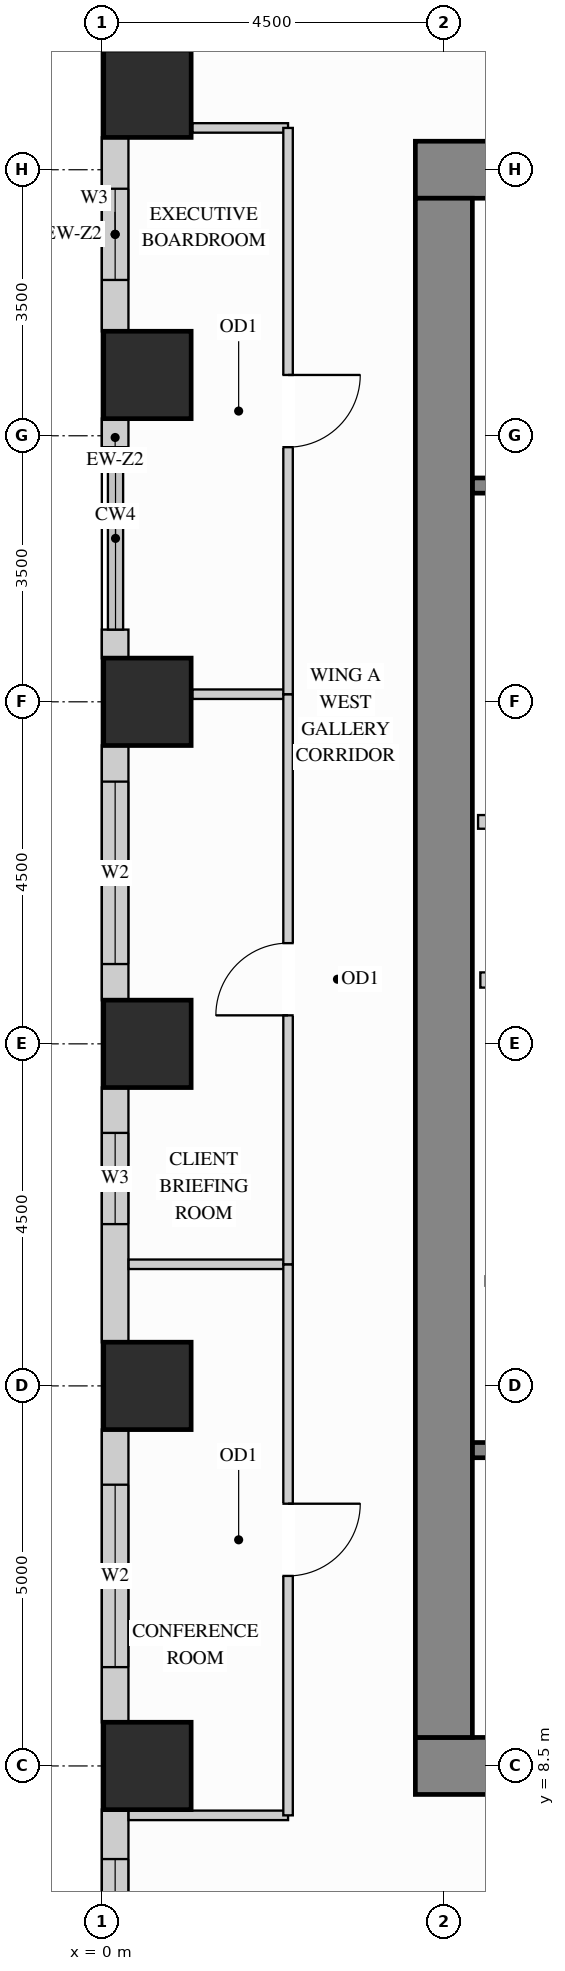
"""IFC4 building model, lengths in metres.
Left out: names, types, materials, properties, quantities, classifications, styles, units other than length and angle.
Written with IfcOpenShell. Run it as: python <this file> out.ifc"""

import sys

from ifc_helpers import new_model, si_unit, direction, frame, frame_2d, origin, origin_2d, place, context, subcontext, project, spatial, rectangle, extrude, source, transform, mapped, element, fill, save


model = new_model("IFC4")
c1 = context("Model", 3, precision=1e-05, world=origin(), true_north=direction((0.0, 1.0)))
c2 = subcontext(c1, "Body", "Model", "MODEL_VIEW")
j1 = project(units=[si_unit("LENGTHUNIT", "METRE"), si_unit("PLANEANGLEUNIT", "RADIAN")], contexts=[c1])
p1 = place(None, origin())
s1 = spatial("IfcSite", under=j1, at=p1, CompositionType="ELEMENT")
p2 = place(p1, origin())
s2 = spatial("IfcBuilding", under=s1, at=p2, CompositionType="ELEMENT")
p3 = place(p2, frame((0.0, 0.0, 81.0)))
s3 = spatial("IfcBuildingStorey", under=s2, at=p3, CompositionType="ELEMENT", Elevation=81.0)
m1 = source(origin(), c2, "Body", "SweptSolid", [
    extrude(rectangle(XDim=1.15, YDim=1.15, at=origin_2d()), origin(), (0.0, 0.0, 1.0), 3.38),
])
for number, where, z_axis, x_axis in (
    (1, (0.6, 13.5, 0.0), (0.0, 0.0, 1.0), (1.0, 0.0, 0.0)),
    (2, (0.6, 18.0, 0.0), (0.0, 0.0, 1.0), (1.0, 0.0, 0.0)),
    (3, (0.6, 22.5, 0.0), (0.0, 0.0, 1.0), (1.0, 0.0, 0.0)),
    (4, (0.6, 26.8, 0.0), (0.0, 0.0, 1.0), (1.0, 0.0, 0.0)),
    (5, (0.6, 30.5, 0.0), (0.0, 0.0, 1.0), (1.0, 0.0, 0.0)),
    (6, (0.6, 8.5, 0.0), (0.0, 0.0, 1.0), (1.0, 0.0, 0.0)),
):
    element("IfcColumn", number, at=place(p3, frame(where, z_axis=z_axis, x_axis=x_axis)), inside=s3, PredefinedType="COLUMN", context=c2, shape_type="MappedRepresentation", body=[
        mapped(m1, transform((0.0, 0.0, 0.0), x_axis=(1.0, 0.0, 0.0), y_axis=(0.0, 1.0, 0.0), z_axis=(0.0, 0.0, 1.0))),
    ])
m2 = source(origin(), c2, "Body", "SweptSolid", [
    extrude(rectangle(XDim=10.75, YDim=0.75, at=frame_2d((5.375, 0.0))), origin(), (0.0, 0.0, 1.0), 3.38),
])
for number, where, z_axis, x_axis in (
    (7, (4.125, 29.5, 0.0), (0.0, 0.0, 1.0), (1.0, 0.0, 0.0)),
    (8, (4.125, 8.5, 0.0), (0.0, 0.0, 1.0), (1.0, 0.0, 0.0)),
):
    element("IfcWall", number, at=place(p3, frame(where, z_axis=z_axis, x_axis=x_axis)), inside=s3, PredefinedType="SHEAR", context=c2, shape_type="MappedRepresentation", body=[
        mapped(m2, transform((0.0, 0.0, 0.0), x_axis=(1.0, 0.0, 0.0), y_axis=(0.0, 1.0, 0.0), z_axis=(0.0, 0.0, 1.0))),
    ])
m3 = source(origin(), c2, "Body", "SweptSolid", [
    extrude(rectangle(XDim=20.25, YDim=0.75, at=frame_2d((10.125, 0.0))), origin(), (0.0, 0.0, 1.0), 3.38),
])
p4 = place(p3, frame((4.5, 8.875, 0.0), z_axis=(0.0, 0.0, 1.0), x_axis=(0.0, 1.0, 0.0)))
e9 = element("IfcWall", 9, at=p4, inside=s3, PredefinedType="SHEAR", context=c2, shape_type="MappedRepresentation", body=[
    mapped(m3, transform((0.0, 0.0, 0.0), x_axis=(1.0, 0.0, 0.0), y_axis=(0.0, 1.0, 0.0), z_axis=(0.0, 0.0, 1.0))),
])
p5 = place(p3, frame((0.175, 29.927, 0.0), z_axis=(0.0, 0.0, 1.0), x_axis=(0.0, -1.0, 0.0)))
e10 = element("IfcWall", 10, at=p5, inside=s3, PredefinedType="SOLIDWALL", context=c2, shape_type="SweptSolid", body=[
    extrude(rectangle(XDim=2.554, YDim=0.35, at=frame_2d((1.277, 0.0))), origin(), (0.0, 0.0, 1.0), 3.365),
])
p6 = place(p5, frame((0.677, 0.0, 0.78)))
e11 = element("IfcOpeningElement", 11, at=p6, cuts=e10, PredefinedType="OPENING", context=c2, shape_type="SweptSolid", body=[
    extrude(rectangle(XDim=1.2, YDim=2.1, at=frame_2d((0.6, 1.05))), frame((0.0, 0.185, 0.0), z_axis=(0.0, -1.0, 0.0), x_axis=(1.0, 0.0, 0.0)), (0.0, 0.0, 1.0), 0.37),
])
m4 = source(origin(), c2, "Body", "SweptSolid", [
    extrude(rectangle(XDim=0.377, YDim=0.35, at=frame_2d((0.188, 0.0))), origin(), (0.0, 0.0, 1.0), 3.365),
])
for number, where, z_axis, x_axis in (
    (12, (0.175, 26.227, 0.0), (0.0, 0.0, 1.0), (0.0, -1.0, 0.0)),
    (13, (0.175, 23.45, 0.0), (0.0, 0.0, 1.0), (0.0, -1.0, 0.0)),
):
    element("IfcWall", number, at=place(p3, frame(where, z_axis=z_axis, x_axis=x_axis)), inside=s3, PredefinedType="SOLIDWALL", context=c2, shape_type="MappedRepresentation", body=[
        mapped(m4, transform((0.0, 0.0, 0.0), x_axis=(1.0, 0.0, 0.0), y_axis=(0.0, 1.0, 0.0), z_axis=(0.0, 0.0, 1.0))),
    ])
p7 = place(p3, frame((0.175, 21.927, 0.0), z_axis=(0.0, 0.0, 1.0), x_axis=(0.0, -1.0, 0.0)))
e14 = element("IfcWall", 14, at=p7, inside=s3, PredefinedType="SOLIDWALL", context=c2, shape_type="SweptSolid", body=[
    extrude(rectangle(XDim=3.354, YDim=0.35, at=frame_2d((1.677, 0.0))), origin(), (0.0, 0.0, 1.0), 3.365),
])
p8 = place(p7, frame((0.477, 0.0, 0.78)))
e15 = element("IfcOpeningElement", 15, at=p8, cuts=e14, PredefinedType="OPENING", context=c2, shape_type="SweptSolid", body=[
    extrude(rectangle(XDim=2.4, YDim=2.1, at=frame_2d((1.2, 1.05))), frame((0.0, 0.185, 0.0), z_axis=(0.0, -1.0, 0.0), x_axis=(1.0, 0.0, 0.0)), (0.0, 0.0, 1.0), 0.37),
])
p9 = place(p3, frame((0.175, 17.427, 0.0), z_axis=(0.0, 0.0, 1.0), x_axis=(0.0, -1.0, 0.0)))
e16 = element("IfcWall", 16, at=p9, inside=s3, PredefinedType="SOLIDWALL", context=c2, shape_type="SweptSolid", body=[
    extrude(rectangle(XDim=3.354, YDim=0.35, at=frame_2d((1.677, 0.0))), origin(), (0.0, 0.0, 1.0), 3.365),
])
p10 = place(p9, frame((0.598, 0.0, 0.78)))
e17 = element("IfcOpeningElement", 17, at=p10, cuts=e16, PredefinedType="OPENING", context=c2, shape_type="SweptSolid", body=[
    extrude(rectangle(XDim=1.2, YDim=2.1, at=frame_2d((0.6, 1.05))), frame((0.0, 0.185, 0.0), z_axis=(0.0, -1.0, 0.0), x_axis=(1.0, 0.0, 0.0)), (0.0, 0.0, 1.0), 0.37),
])
p11 = place(p3, frame((0.175, 12.927, 0.0), z_axis=(0.0, 0.0, 1.0), x_axis=(0.0, -1.0, 0.0)))
e18 = element("IfcWall", 18, at=p11, inside=s3, PredefinedType="SOLIDWALL", context=c2, shape_type="SweptSolid", body=[
    extrude(rectangle(XDim=3.854, YDim=0.35, at=frame_2d((1.927, 0.0))), origin(), (0.0, 0.0, 1.0), 3.365),
])
p12 = place(p11, frame((0.727, 0.0, 0.78)))
e19 = element("IfcOpeningElement", 19, at=p12, cuts=e18, PredefinedType="OPENING", context=c2, shape_type="SweptSolid", body=[
    extrude(rectangle(XDim=2.4, YDim=2.1, at=frame_2d((1.2, 1.05))), frame((0.0, 0.185, 0.0), z_axis=(0.0, -1.0, 0.0), x_axis=(1.0, 0.0, 0.0)), (0.0, 0.0, 1.0), 0.37),
])
p13 = place(p3, frame((0.175, 7.927, 0.0), z_axis=(0.0, 0.0, 1.0), x_axis=(0.0, -1.0, 0.0)))
e20 = element("IfcWall", 20, at=p13, inside=s3, PredefinedType="SOLIDWALL", context=c2, shape_type="SweptSolid", body=[
    extrude(rectangle(XDim=3.854, YDim=0.35, at=frame_2d((1.927, 0.0))), origin(), (0.0, 0.0, 1.0), 3.365),
])
p14 = place(p13, frame((0.652, 0.0, 0.78)))
e21 = element("IfcOpeningElement", 21, at=p14, cuts=e20, PredefinedType="OPENING", context=c2, shape_type="SweptSolid", body=[
    extrude(rectangle(XDim=1.2, YDim=2.1, at=frame_2d((0.6, 1.05))), frame((0.0, 0.185, 0.0), z_axis=(0.0, -1.0, 0.0), x_axis=(1.0, 0.0, 0.0)), (0.0, 0.0, 1.0), 0.37),
])
m5 = source(origin(), c2, "Body", "SweptSolid", [
    extrude(rectangle(XDim=2.2, YDim=0.18, at=frame_2d((1.1, 0.0))), origin(), (0.0, 0.0, 1.0), 3.365),
])
p15 = place(p3, frame((4.95, 20.92, 0.0), z_axis=(0.0, 0.0, 1.0), x_axis=(1.0, 0.0, 0.0)))
e22 = element("IfcWall", 22, at=p15, inside=s3, PredefinedType="PARTITIONING", context=c2, shape_type="MappedRepresentation", body=[
    mapped(m5, transform((0.0, 0.0, 0.0), x_axis=(1.0, 0.0, 0.0), y_axis=(0.0, 1.0, 0.0), z_axis=(0.0, 0.0, 1.0))),
])
p16 = place(p3, frame((5.05, 14.88, 0.0), z_axis=(0.0, 0.0, 1.0), x_axis=(1.0, 0.0, 0.0)))
e23 = element("IfcWall", 23, at=p16, inside=s3, PredefinedType="PARTITIONING", context=c2, shape_type="SweptSolid", body=[
    extrude(rectangle(XDim=2.35, YDim=0.125, at=frame_2d((1.175, 0.0))), origin(), (0.0, 0.0, 1.0), 3.365),
])
p17 = place(p16, frame((0.7, 0.0, 0.0)))
e24 = element("IfcOpeningElement", 24, at=p17, cuts=e23, PredefinedType="OPENING", context=c2, shape_type="SweptSolid", body=[
    extrude(rectangle(XDim=0.85, YDim=2.1, at=frame_2d((0.425, 1.05))), frame((0.0, 0.073, 0.0), z_axis=(0.0, -1.0, 0.0), x_axis=(1.0, 0.0, 0.0)), (0.0, 0.0, 1.0), 0.145),
])
m6 = source(origin(), c2, "Body", "SweptSolid", [
    extrude(rectangle(XDim=1.26, YDim=0.125, at=frame_2d((0.63, 0.0))), origin(), (0.0, 0.0, 1.0), 3.365),
])
p18 = place(p3, frame((1.19, 30.05, 0.0), z_axis=(0.0, 0.0, 1.0), x_axis=(1.0, 0.0, 0.0)))
e25 = element("IfcWall", 25, at=p18, inside=s3, PredefinedType="PARTITIONING", context=c2, shape_type="MappedRepresentation", body=[
    mapped(m6, transform((0.0, 0.0, 0.0), x_axis=(1.0, 0.0, 0.0), y_axis=(0.0, 1.0, 0.0), z_axis=(0.0, 0.0, 1.0))),
])
m7 = source(origin(), c2, "Body", "SweptSolid", [
    extrude(rectangle(XDim=2.098, YDim=0.125, at=frame_2d((1.049, 0.0))), origin(), (0.0, 0.0, 1.0), 3.365),
])
for number, where, z_axis, x_axis in (
    (26, (0.352, 7.85, 0.0), (0.0, 0.0, 1.0), (1.0, 0.0, 0.0)),
    (27, (0.352, 15.1, 0.0), (0.0, 0.0, 1.0), (1.0, 0.0, 0.0)),
):
    element("IfcWall", number, at=place(p3, frame(where, z_axis=z_axis, x_axis=x_axis)), inside=s3, PredefinedType="PARTITIONING", context=c2, shape_type="MappedRepresentation", body=[
        mapped(m7, transform((0.0, 0.0, 0.0), x_axis=(1.0, 0.0, 0.0), y_axis=(0.0, 1.0, 0.0), z_axis=(0.0, 0.0, 1.0))),
    ])
p19 = place(p3, frame((1.19, 22.6, 0.0), z_axis=(0.0, 0.0, 1.0), x_axis=(1.0, 0.0, 0.0)))
e28 = element("IfcWall", 28, at=p19, inside=s3, PredefinedType="PARTITIONING", context=c2, shape_type="MappedRepresentation", body=[
    mapped(m6, transform((0.0, 0.0, 0.0), x_axis=(1.0, 0.0, 0.0), y_axis=(0.0, 1.0, 0.0), z_axis=(0.0, 0.0, 1.0))),
])
p20 = place(p3, frame((2.45, 7.85, 0.0), z_axis=(0.0, 0.0, 1.0), x_axis=(0.0, 1.0, 0.0)))
e29 = element("IfcWall", 29, at=p20, inside=s3, PredefinedType="PARTITIONING", context=c2, shape_type="SweptSolid", body=[
    extrude(rectangle(XDim=7.25, YDim=0.125, at=frame_2d((3.625, 0.0))), origin(), (0.0, 0.0, 1.0), 3.365),
])
p21 = place(p20, frame((3.15, 0.0, 0.0)))
e30 = element("IfcOpeningElement", 30, at=p21, cuts=e29, PredefinedType="OPENING", context=c2, shape_type="SweptSolid", body=[
    extrude(rectangle(XDim=0.95, YDim=2.15, at=frame_2d((0.475, 1.075))), frame((0.0, 0.073, 0.0), z_axis=(0.0, -1.0, 0.0), x_axis=(1.0, 0.0, 0.0)), (0.0, 0.0, 1.0), 0.145),
])
p22 = place(p3, frame((2.45, 15.1, 0.0), z_axis=(0.0, 0.0, 1.0), x_axis=(0.0, 1.0, 0.0)))
e31 = element("IfcWall", 31, at=p22, inside=s3, PredefinedType="PARTITIONING", context=c2, shape_type="SweptSolid", body=[
    extrude(rectangle(XDim=7.5, YDim=0.125, at=frame_2d((3.75, 0.0))), origin(), (0.0, 0.0, 1.0), 3.365),
])
p23 = place(p22, frame((3.275, 0.0, 0.0)))
e32 = element("IfcOpeningElement", 32, at=p23, cuts=e31, PredefinedType="OPENING", context=c2, shape_type="SweptSolid", body=[
    extrude(rectangle(XDim=0.95, YDim=2.15, at=frame_2d((0.475, 1.075))), frame((0.0, 0.073, 0.0), z_axis=(0.0, -1.0, 0.0), x_axis=(1.0, 0.0, 0.0)), (0.0, 0.0, 1.0), 0.145),
])
p24 = place(p3, frame((2.45, 22.6, 0.0), z_axis=(0.0, 0.0, 1.0), x_axis=(0.0, 1.0, 0.0)))
e33 = element("IfcWall", 33, at=p24, inside=s3, PredefinedType="PARTITIONING", context=c2, shape_type="SweptSolid", body=[
    extrude(rectangle(XDim=7.45, YDim=0.125, at=frame_2d((3.725, 0.0))), origin(), (0.0, 0.0, 1.0), 3.365),
])
p25 = place(p24, frame((3.25, 0.0, 0.0)))
e34 = element("IfcOpeningElement", 34, at=p25, cuts=e33, PredefinedType="OPENING", context=c2, shape_type="SweptSolid", body=[
    extrude(rectangle(XDim=0.95, YDim=2.15, at=frame_2d((0.475, 1.075))), frame((0.0, 0.073, 0.0), z_axis=(0.0, -1.0, 0.0), x_axis=(1.0, 0.0, 0.0)), (0.0, 0.0, 1.0), 0.145),
])
m8 = source(origin(), c2, "Body", "SweptSolid", [
    extrude(rectangle(XDim=2.09, YDim=0.2, at=frame_2d((1.045, 0.0))), origin(), (0.0, 0.0, 1.0), 3.365),
])
p26 = place(p3, frame((4.98, 18.84, 0.0), z_axis=(0.0, 0.0, 1.0), x_axis=(1.0, 0.0, 0.0)))
e35 = element("IfcWall", 35, at=p26, inside=s3, PredefinedType="PARTITIONING", context=c2, shape_type="MappedRepresentation", body=[
    mapped(m8, transform((0.0, 0.0, 0.0), x_axis=(1.0, 0.0, 0.0), y_axis=(0.0, 1.0, 0.0), z_axis=(0.0, 0.0, 1.0))),
])
p27 = place(p3, frame((4.877, 12.655, 0.0), z_axis=(0.0, 0.0, 1.0), x_axis=(1.0, 0.0, 0.0)))
e36 = element("IfcWall", 36, at=p27, inside=s3, PredefinedType="SHEAR", context=c2, shape_type="SweptSolid", body=[
    extrude(rectangle(XDim=7.528, YDim=0.2, at=frame_2d((3.764, 0.0))), origin(), (0.0, 0.0, 1.0), 3.38),
])
p28 = place(p27, frame((0.4, 0.0, 0.0)))
e37 = element("IfcOpeningElement", 37, at=p28, cuts=e36, PredefinedType="OPENING", context=c2, shape_type="SweptSolid", body=[
    extrude(rectangle(XDim=1.1, YDim=2.15, at=frame_2d((0.55, 1.075))), frame((0.0, 0.11, 0.0), z_axis=(0.0, -1.0, 0.0), x_axis=(1.0, 0.0, 0.0)), (0.0, 0.0, 1.0), 0.22),
])
p29 = place(p3, frame((4.877, 25.345, 0.0), z_axis=(0.0, 0.0, 1.0), x_axis=(1.0, 0.0, 0.0)))
e38 = element("IfcWall", 38, at=p29, inside=s3, PredefinedType="SHEAR", context=c2, shape_type="SweptSolid", body=[
    extrude(rectangle(XDim=7.528, YDim=0.2, at=frame_2d((3.764, 0.0))), origin(), (0.0, 0.0, 1.0), 3.38),
])
p30 = place(p29, frame((0.4, 0.0, 0.0)))
e39 = element("IfcOpeningElement", 39, at=p30, cuts=e38, PredefinedType="OPENING", context=c2, shape_type="SweptSolid", body=[
    extrude(rectangle(XDim=1.1, YDim=2.15, at=frame_2d((0.55, 1.075))), frame((0.0, 0.11, 0.0), z_axis=(0.0, -1.0, 0.0), x_axis=(1.0, 0.0, 0.0)), (0.0, 0.0, 1.0), 0.22),
])
m9 = source(origin(), c2, "Body", "SweptSolid", [
    extrude(rectangle(XDim=0.95, YDim=2.15, at=frame_2d((0.475, 1.075))), frame((0.0, 0.025, 0.0), z_axis=(0.0, -1.0, 0.0), x_axis=(1.0, 0.0, 0.0)), (0.0, 0.0, 1.0), 0.05),
])
p31 = place(p21, origin())
e40 = element("IfcDoor", 40, at=p31, inside=s3, OperationType="SINGLE_SWING_RIGHT", PredefinedType="DOOR", context=c2, shape_type="MappedRepresentation", body=[
    mapped(m9, transform((0.0, 0.0, 0.0), x_axis=(1.0, 0.0, 0.0), y_axis=(0.0, 1.0, 0.0), z_axis=(0.0, 0.0, 1.0))),
])
fill(e30, e40)
p32 = place(p23, origin())
e41 = element("IfcDoor", 41, at=p32, inside=s3, OperationType="SINGLE_SWING_LEFT", PredefinedType="DOOR", context=c2, shape_type="MappedRepresentation", body=[
    mapped(m9, transform((0.0, 0.0, 0.0), x_axis=(1.0, 0.0, 0.0), y_axis=(0.0, 1.0, 0.0), z_axis=(0.0, 0.0, 1.0))),
])
fill(e32, e41)
p33 = place(p25, origin())
e42 = element("IfcDoor", 42, at=p33, inside=s3, OperationType="SINGLE_SWING_RIGHT", PredefinedType="DOOR", context=c2, shape_type="MappedRepresentation", body=[
    mapped(m9, transform((0.0, 0.0, 0.0), x_axis=(1.0, 0.0, 0.0), y_axis=(0.0, 1.0, 0.0), z_axis=(0.0, 0.0, 1.0))),
])
fill(e34, e42)
m10 = source(origin(), c2, "Body", "SweptSolid", [
    extrude(rectangle(XDim=2.4, YDim=2.1, at=frame_2d((1.2, 1.05))), frame((0.0, 0.03, 0.0), z_axis=(0.0, -1.0, 0.0), x_axis=(1.0, 0.0, 0.0)), (0.0, 0.0, 1.0), 0.06),
])
p34 = place(p8, origin())
e43 = element("IfcWindow", 43, at=p34, inside=s3, PartitioningType="SINGLE_PANEL", PredefinedType="WINDOW", context=c2, shape_type="MappedRepresentation", body=[
    mapped(m10, transform((0.0, 0.0, 0.0), x_axis=(1.0, 0.0, 0.0), y_axis=(0.0, 1.0, 0.0), z_axis=(0.0, 0.0, 1.0))),
])
fill(e15, e43)
p35 = place(p12, origin())
e44 = element("IfcWindow", 44, at=p35, inside=s3, PartitioningType="SINGLE_PANEL", PredefinedType="WINDOW", context=c2, shape_type="MappedRepresentation", body=[
    mapped(m10, transform((0.0, 0.0, 0.0), x_axis=(1.0, 0.0, 0.0), y_axis=(0.0, 1.0, 0.0), z_axis=(0.0, 0.0, 1.0))),
])
fill(e19, e44)
m11 = source(origin(), c2, "Body", "SweptSolid", [
    extrude(rectangle(XDim=1.2, YDim=2.1, at=frame_2d((0.6, 1.05))), frame((0.0, 0.03, 0.0), z_axis=(0.0, -1.0, 0.0), x_axis=(1.0, 0.0, 0.0)), (0.0, 0.0, 1.0), 0.06),
])
p36 = place(p6, origin())
e45 = element("IfcWindow", 45, at=p36, inside=s3, PartitioningType="SINGLE_PANEL", PredefinedType="WINDOW", context=c2, shape_type="MappedRepresentation", body=[
    mapped(m11, transform((0.0, 0.0, 0.0), x_axis=(1.0, 0.0, 0.0), y_axis=(0.0, 1.0, 0.0), z_axis=(0.0, 0.0, 1.0))),
])
fill(e11, e45)
p37 = place(p10, origin())
e46 = element("IfcWindow", 46, at=p37, inside=s3, PartitioningType="SINGLE_PANEL", PredefinedType="WINDOW", context=c2, shape_type="MappedRepresentation", body=[
    mapped(m11, transform((0.0, 0.0, 0.0), x_axis=(1.0, 0.0, 0.0), y_axis=(0.0, 1.0, 0.0), z_axis=(0.0, 0.0, 1.0))),
])
fill(e17, e46)
p38 = place(p14, origin())
e47 = element("IfcWindow", 47, at=p38, inside=s3, PartitioningType="SINGLE_PANEL", PredefinedType="WINDOW", context=c2, shape_type="MappedRepresentation", body=[
    mapped(m11, transform((0.0, 0.0, 0.0), x_axis=(1.0, 0.0, 0.0), y_axis=(0.0, 1.0, 0.0), z_axis=(0.0, 0.0, 1.0))),
])
fill(e21, e47)
save(model, sys.argv[1])
